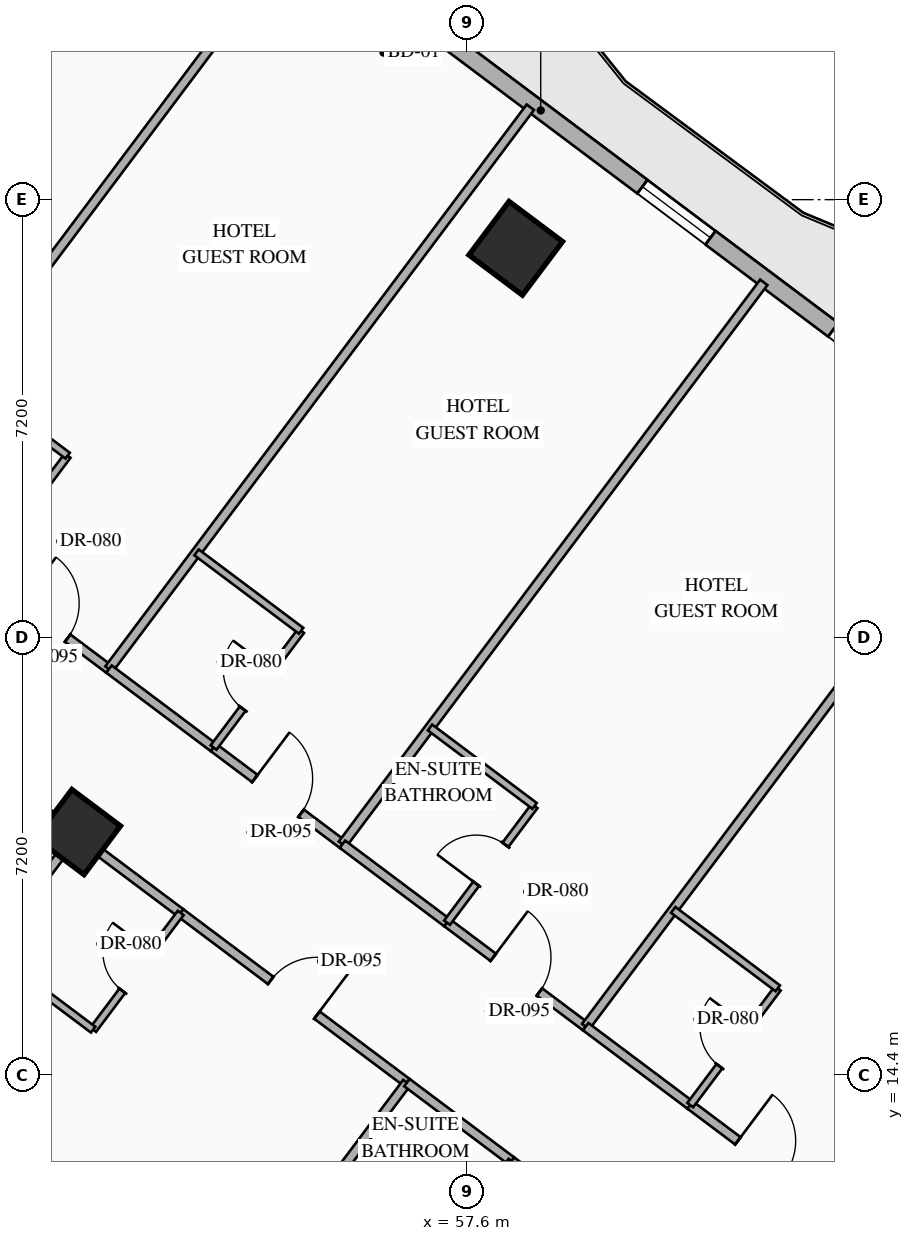
"""IFC4 building model, lengths in metres.
Left out: names, types, materials, properties, quantities, classifications, styles, units other than length and angle.
Written with IfcOpenShell. Run it as: python <this file> out.ifc"""

import sys

from ifc_helpers import new_model, si_unit, direction, frame, frame_2d, origin, origin_2d, place, context, subcontext, project, spatial, rectangle, hollow_rectangle, extrude, element, fill, save


model = new_model("IFC4")
c1 = context("Model", 3, precision=1e-05, world=origin(), true_north=direction((0.0, 1.0)))
c2 = subcontext(c1, "Body", "Model", "MODEL_VIEW")
j1 = project(units=[si_unit("LENGTHUNIT", "METRE"), si_unit("PLANEANGLEUNIT", "RADIAN")], contexts=[c1])
p1 = place(None, origin())
s1 = spatial("IfcSite", under=j1, at=p1, CompositionType="ELEMENT")
p2 = place(p1, origin())
s2 = spatial("IfcBuilding", under=s1, at=p2, CompositionType="ELEMENT")
p3 = place(p2, frame((0.0, 0.0, 63.4)))
s3 = spatial("IfcBuildingStorey", under=s2, at=p3, CompositionType="ELEMENT", Elevation=63.4)
p4 = place(p3, frame((58.4, 28.0, 0.0), z_axis=(0.0, 0.0, 1.0), x_axis=(0.799999996291, -0.600000004945, 0.0)))
e1 = element("IfcColumn", 1, at=p4, inside=s3, PredefinedType="COLUMN", context=c2, shape_type="SweptSolid", body=[
    extrude(hollow_rectangle(XDim=1.1, YDim=1.1, WallThickness=0.04, at=origin_2d()), origin(), (0.0, 0.0, 1.0), 3.35),
])
p5 = place(p3, frame((51.2, 18.4, 0.0), z_axis=(0.0, 0.0, 1.0), x_axis=(0.799999996291, -0.600000004945, 0.0)))
e2 = element("IfcColumn", 2, at=p5, inside=s3, PredefinedType="COLUMN", context=c2, shape_type="SweptSolid", body=[
    extrude(hollow_rectangle(XDim=1.0, YDim=1.0, WallThickness=0.038, at=origin_2d()), origin(), (0.0, 0.0, 1.0), 3.35),
])
p6 = place(p3, frame((44.86, 40.73, 0.0), z_axis=(0.0, 0.0, 1.0), x_axis=(0.800006902154, -0.599990797017, 0.0)))
e3 = element("IfcWall", 3, at=p6, inside=s3, PredefinedType="STANDARD", context=c2, shape_type="SweptSolid", body=[
    extrude(rectangle(XDim=29.712, YDim=0.28, at=frame_2d((14.856, 0.0))), origin(), (0.0, 0.0, 1.0), 3.13),
])
p7 = place(p6, frame((14.249, 0.0, 0.0)))
e4 = element("IfcOpeningElement", 4, at=p7, cuts=e3, PredefinedType="OPENING", context=c2, shape_type="SweptSolid", body=[
    extrude(rectangle(XDim=1.1, YDim=2.2, at=frame_2d((0.55, 1.1))), frame((0.0, 0.15, 0.0), z_axis=(0.0, -1.0, 0.0), x_axis=(1.0, 0.0, 0.0)), (0.0, 0.0, 1.0), 0.3),
])
p8 = place(p6, frame((1.612, 0.0, 0.85)))
e5 = element("IfcOpeningElement", 5, at=p8, cuts=e3, PredefinedType="OPENING", context=c2, shape_type="SweptSolid", body=[
    extrude(rectangle(XDim=1.4, YDim=1.8, at=frame_2d((0.7, 0.9))), frame((0.0, 0.15, 0.0), z_axis=(0.0, -1.0, 0.0), x_axis=(1.0, 0.0, 0.0)), (0.0, 0.0, 1.0), 0.3),
])
p9 = place(p6, frame((5.667, 0.0, 0.85)))
e6 = element("IfcOpeningElement", 6, at=p9, cuts=e3, PredefinedType="OPENING", context=c2, shape_type="SweptSolid", body=[
    extrude(rectangle(XDim=1.4, YDim=1.8, at=frame_2d((0.7, 0.9))), frame((0.0, 0.15, 0.0), z_axis=(0.0, -1.0, 0.0), x_axis=(1.0, 0.0, 0.0)), (0.0, 0.0, 1.0), 0.3),
])
p10 = place(p6, frame((9.912, 0.0, 0.85)))
e7 = element("IfcOpeningElement", 7, at=p10, cuts=e3, PredefinedType="OPENING", context=c2, shape_type="SweptSolid", body=[
    extrude(rectangle(XDim=1.4, YDim=1.8, at=frame_2d((0.7, 0.9))), frame((0.0, 0.15, 0.0), z_axis=(0.0, -1.0, 0.0), x_axis=(1.0, 0.0, 0.0)), (0.0, 0.0, 1.0), 0.3),
])
p11 = place(p6, frame((19.528, 0.0, 0.85)))
e8 = element("IfcOpeningElement", 8, at=p11, cuts=e3, PredefinedType="OPENING", context=c2, shape_type="SweptSolid", body=[
    extrude(rectangle(XDim=1.4, YDim=1.8, at=frame_2d((0.7, 0.9))), frame((0.0, 0.15, 0.0), z_axis=(0.0, -1.0, 0.0), x_axis=(1.0, 0.0, 0.0)), (0.0, 0.0, 1.0), 0.3),
])
p12 = place(p6, frame((23.451, 0.0, 0.85)))
e9 = element("IfcOpeningElement", 9, at=p12, cuts=e3, PredefinedType="OPENING", context=c2, shape_type="SweptSolid", body=[
    extrude(rectangle(XDim=1.4, YDim=1.8, at=frame_2d((0.7, 0.9))), frame((0.0, 0.15, 0.0), z_axis=(0.0, -1.0, 0.0), x_axis=(1.0, 0.0, 0.0)), (0.0, 0.0, 1.0), 0.3),
])
p13 = place(p6, frame((27.852, 0.0, 0.85)))
e10 = element("IfcOpeningElement", 10, at=p13, cuts=e3, PredefinedType="OPENING", context=c2, shape_type="SweptSolid", body=[
    extrude(rectangle(XDim=1.4, YDim=1.8, at=frame_2d((0.7, 0.9))), frame((0.0, 0.15, 0.0), z_axis=(0.0, -1.0, 0.0), x_axis=(1.0, 0.0, 0.0)), (0.0, 0.0, 1.0), 0.3),
])
p14 = place(p3, frame((49.59, 22.67, 0.0), z_axis=(0.0, 0.0, 1.0), x_axis=(0.800011056104, -0.599985258246, 0.0)))
e11 = element("IfcWall", 11, at=p14, inside=s3, PredefinedType="PARTITIONING", context=c2, shape_type="SweptSolid", body=[
    extrude(rectangle(XDim=2.65, YDim=0.15, at=frame_2d((1.325, 0.0))), origin(), (0.0, 0.0, 1.0), 2.775),
])
p15 = place(p14, frame((0.85, 0.0, 0.0)))
e12 = element("IfcOpeningElement", 12, at=p15, cuts=e11, PredefinedType="OPENING", context=c2, shape_type="SweptSolid", body=[
    extrude(rectangle(XDim=0.95, YDim=2.15, at=frame_2d((0.475, 1.075))), frame((0.0, 0.085, 0.0), z_axis=(0.0, -1.0, 0.0), x_axis=(1.0, 0.0, 0.0)), (0.0, 0.0, 1.0), 0.17),
])
p16 = place(p3, frame((49.59, 22.67, 0.0), z_axis=(0.0, 0.0, 1.0), x_axis=(0.599951172744, 0.800036618114, 0.0)))
e13 = element("IfcWall", 13, at=p16, inside=s3, PredefinedType="PARTITIONING", context=c2, shape_type="SweptSolid", body=[
    extrude(rectangle(XDim=2.4, YDim=0.12, at=frame_2d((1.2, 0.0))), origin(), (0.0, 0.0, 1.0), 3.13),
])
p17 = place(p16, frame((0.8, 0.0, 0.0)))
e14 = element("IfcOpeningElement", 14, at=p17, cuts=e13, PredefinedType="OPENING", context=c2, shape_type="SweptSolid", body=[
    extrude(rectangle(XDim=0.8, YDim=2.06, at=frame_2d((0.4, 1.03))), frame((0.0, 0.07, 0.0), z_axis=(0.0, -1.0, 0.0), x_axis=(1.0, 0.0, 0.0)), (0.0, 0.0, 1.0), 0.14),
])
p18 = place(p3, frame((49.31, 25.88, 0.0), z_axis=(0.0, 0.0, 1.0), x_axis=(0.800040880289, -0.59994548908, 0.0)))
e15 = element("IfcWall", 15, at=p18, inside=s3, PredefinedType="PARTITIONING", context=c2, shape_type="SweptSolid", body=[
    extrude(rectangle(XDim=2.15, YDim=0.12, at=frame_2d((1.075, 0.0))), origin(), (0.0, 0.0, 1.0), 3.13),
])
for number, where, z_axis, x_axis in (
    (16, (47.87, 23.96, 0.0), (0.0, 0.0, 1.0), (0.6, 0.8, 0.0)),
    (17, (51.71, 21.08, 0.0), (0.0, 0.0, 1.0), (0.6, 0.8, 0.0)),
):
    element("IfcWall", number, at=place(p3, frame(where, z_axis=z_axis, x_axis=x_axis)), inside=s3, PredefinedType="PARTITIONING", context=c2, shape_type="SweptSolid", body=[
        extrude(rectangle(XDim=11.55, YDim=0.15, at=frame_2d((5.775, 0.0))), origin(), (0.0, 0.0, 1.0), 3.13),
    ])
p19 = place(p3, frame((51.71, 21.08, 0.0), z_axis=(0.0, 0.0, 1.0), x_axis=(0.79998637334, -0.60001816845, 0.0)))
e18 = element("IfcWall", 18, at=p19, inside=s3, PredefinedType="PARTITIONING", context=c2, shape_type="SweptSolid", body=[
    extrude(rectangle(XDim=2.15, YDim=0.15, at=frame_2d((1.075, 0.0))), origin(), (0.0, 0.0, 1.0), 2.775),
])
p20 = place(p3, frame((53.43, 19.79, 0.0), z_axis=(0.0, 0.0, 1.0), x_axis=(0.8, -0.6, 0.0)))
e19 = element("IfcWall", 19, at=p20, inside=s3, PredefinedType="PARTITIONING", context=c2, shape_type="SweptSolid", body=[
    extrude(rectangle(XDim=2.65, YDim=0.15, at=frame_2d((1.325, 0.0))), origin(), (0.0, 0.0, 1.0), 2.775),
])
p21 = place(p20, frame((0.85, 0.0, 0.0)))
e20 = element("IfcOpeningElement", 20, at=p21, cuts=e19, PredefinedType="OPENING", context=c2, shape_type="SweptSolid", body=[
    extrude(rectangle(XDim=0.95, YDim=2.15, at=frame_2d((0.475, 1.075))), frame((0.0, 0.085, 0.0), z_axis=(0.0, -1.0, 0.0), x_axis=(1.0, 0.0, 0.0)), (0.0, 0.0, 1.0), 0.17),
])
p22 = place(p3, frame((53.43, 19.79, 0.0), z_axis=(0.0, 0.0, 1.0), x_axis=(0.600065100855, 0.79995117022, 0.0)))
e21 = element("IfcWall", 21, at=p22, inside=s3, PredefinedType="PARTITIONING", context=c2, shape_type="SweptSolid", body=[
    extrude(rectangle(XDim=2.4, YDim=0.12, at=frame_2d((1.2, 0.0))), origin(), (0.0, 0.0, 1.0), 3.13),
])
p23 = place(p22, frame((0.8, 0.0, 0.0)))
e22 = element("IfcOpeningElement", 22, at=p23, cuts=e21, PredefinedType="OPENING", context=c2, shape_type="SweptSolid", body=[
    extrude(rectangle(XDim=0.8, YDim=2.06, at=frame_2d((0.4, 1.03))), frame((0.0, 0.07, 0.0), z_axis=(0.0, -1.0, 0.0), x_axis=(1.0, 0.0, 0.0)), (0.0, 0.0, 1.0), 0.14),
])
p24 = place(p3, frame((53.15, 23.0, 0.0), z_axis=(0.0, 0.0, 1.0), x_axis=(0.800027249606, -0.599963665473, 0.0)))
e23 = element("IfcWall", 23, at=p24, inside=s3, PredefinedType="PARTITIONING", context=c2, shape_type="SweptSolid", body=[
    extrude(rectangle(XDim=2.15, YDim=0.12, at=frame_2d((1.075, 0.0))), origin(), (0.0, 0.0, 1.0), 3.13),
])
p25 = place(p3, frame((55.55, 18.2, 0.0), z_axis=(0.0, 0.0, 1.0), x_axis=(0.599996617946, 0.80000253653, 0.0)))
e24 = element("IfcWall", 24, at=p25, inside=s3, PredefinedType="PARTITIONING", context=c2, shape_type="SweptSolid", body=[
    extrude(rectangle(XDim=11.55, YDim=0.15, at=frame_2d((5.775, 0.0))), origin(), (0.0, 0.0, 1.0), 3.13),
])
p26 = place(p3, frame((55.55, 18.2, 0.0), z_axis=(0.0, 0.0, 1.0), x_axis=(0.79998637334, -0.60001816845, 0.0)))
e25 = element("IfcWall", 25, at=p26, inside=s3, PredefinedType="PARTITIONING", context=c2, shape_type="SweptSolid", body=[
    extrude(rectangle(XDim=2.15, YDim=0.15, at=frame_2d((1.075, 0.0))), origin(), (0.0, 0.0, 1.0), 2.775),
])
p27 = place(p3, frame((57.27, 16.91, 0.0), z_axis=(0.0, 0.0, 1.0), x_axis=(0.800010279488, -0.599986293772, 0.0)))
e26 = element("IfcWall", 26, at=p27, inside=s3, PredefinedType="PARTITIONING", context=c2, shape_type="SweptSolid", body=[
    extrude(rectangle(XDim=2.85, YDim=0.15, at=frame_2d((1.425, 0.0))), origin(), (0.0, 0.0, 1.0), 2.775),
])
p28 = place(p27, frame((0.95, 0.0, 0.0)))
e27 = element("IfcOpeningElement", 27, at=p28, cuts=e26, PredefinedType="OPENING", context=c2, shape_type="SweptSolid", body=[
    extrude(rectangle(XDim=0.95, YDim=2.15, at=frame_2d((0.475, 1.075))), frame((0.0, 0.085, 0.0), z_axis=(0.0, -1.0, 0.0), x_axis=(1.0, 0.0, 0.0)), (0.0, 0.0, 1.0), 0.17),
])
p29 = place(p3, frame((57.27, 16.91, 0.0), z_axis=(0.0, 0.0, 1.0), x_axis=(0.599951172744, 0.800036618114, 0.0)))
e28 = element("IfcWall", 28, at=p29, inside=s3, PredefinedType="PARTITIONING", context=c2, shape_type="SweptSolid", body=[
    extrude(rectangle(XDim=2.4, YDim=0.12, at=frame_2d((1.2, 0.0))), origin(), (0.0, 0.0, 1.0), 3.13),
])
p30 = place(p29, frame((0.8, 0.0, 0.0)))
e29 = element("IfcOpeningElement", 29, at=p30, cuts=e28, PredefinedType="OPENING", context=c2, shape_type="SweptSolid", body=[
    extrude(rectangle(XDim=0.8, YDim=2.06, at=frame_2d((0.4, 1.03))), frame((0.0, 0.07, 0.0), z_axis=(0.0, -1.0, 0.0), x_axis=(1.0, 0.0, 0.0)), (0.0, 0.0, 1.0), 0.14),
])
p31 = place(p3, frame((56.99, 20.12, 0.0), z_axis=(0.0, 0.0, 1.0), x_axis=(0.79998637334, -0.60001816845, 0.0)))
e30 = element("IfcWall", 30, at=p31, inside=s3, PredefinedType="PARTITIONING", context=c2, shape_type="SweptSolid", body=[
    extrude(rectangle(XDim=2.15, YDim=0.12, at=frame_2d((1.075, 0.0))), origin(), (0.0, 0.0, 1.0), 3.13),
])
p32 = place(p3, frame((59.55, 15.2, 0.0), z_axis=(0.0, 0.0, 1.0), x_axis=(0.599996617946, 0.80000253653, 0.0)))
e31 = element("IfcWall", 31, at=p32, inside=s3, PredefinedType="PARTITIONING", context=c2, shape_type="SweptSolid", body=[
    extrude(rectangle(XDim=11.55, YDim=0.15, at=frame_2d((5.775, 0.0))), origin(), (0.0, 0.0, 1.0), 3.13),
])
p33 = place(p3, frame((59.55, 15.2, 0.0), z_axis=(0.0, 0.0, 1.0), x_axis=(0.79998637334, -0.60001816845, 0.0)))
e32 = element("IfcWall", 32, at=p33, inside=s3, PredefinedType="PARTITIONING", context=c2, shape_type="SweptSolid", body=[
    extrude(rectangle(XDim=2.15, YDim=0.15, at=frame_2d((1.075, 0.0))), origin(), (0.0, 0.0, 1.0), 2.775),
])
p34 = place(p3, frame((61.27, 13.91, 0.0), z_axis=(0.0, 0.0, 1.0), x_axis=(0.800010068184, -0.59998657552, 0.0)))
e33 = element("IfcWall", 33, at=p34, inside=s3, PredefinedType="PARTITIONING", context=c2, shape_type="SweptSolid", body=[
    extrude(rectangle(XDim=2.91, YDim=0.15, at=frame_2d((1.455, 0.0))), origin(), (0.0, 0.0, 1.0), 3.13),
])
p35 = place(p34, frame((0.98, 0.0, 0.0)))
e34 = element("IfcOpeningElement", 34, at=p35, cuts=e33, PredefinedType="OPENING", context=c2, shape_type="SweptSolid", body=[
    extrude(rectangle(XDim=0.95, YDim=2.15, at=frame_2d((0.475, 1.075))), frame((0.0, 0.085, 0.0), z_axis=(0.0, -1.0, 0.0), x_axis=(1.0, 0.0, 0.0)), (0.0, 0.0, 1.0), 0.17),
])
p36 = place(p3, frame((61.27, 13.91, 0.0), z_axis=(0.0, 0.0, 1.0), x_axis=(0.599951172744, 0.800036618114, 0.0)))
e35 = element("IfcWall", 35, at=p36, inside=s3, PredefinedType="PARTITIONING", context=c2, shape_type="SweptSolid", body=[
    extrude(rectangle(XDim=2.4, YDim=0.12, at=frame_2d((1.2, 0.0))), origin(), (0.0, 0.0, 1.0), 3.13),
])
p37 = place(p36, frame((0.8, 0.0, 0.0)))
e36 = element("IfcOpeningElement", 36, at=p37, cuts=e35, PredefinedType="OPENING", context=c2, shape_type="SweptSolid", body=[
    extrude(rectangle(XDim=0.8, YDim=2.06, at=frame_2d((0.4, 1.03))), frame((0.0, 0.07, 0.0), z_axis=(0.0, -1.0, 0.0), x_axis=(1.0, 0.0, 0.0)), (0.0, 0.0, 1.0), 0.14),
])
p38 = place(p3, frame((60.99, 17.12, 0.0), z_axis=(0.0, 0.0, 1.0), x_axis=(0.79998637334, -0.60001816845, 0.0)))
e37 = element("IfcWall", 37, at=p38, inside=s3, PredefinedType="PARTITIONING", context=c2, shape_type="SweptSolid", body=[
    extrude(rectangle(XDim=2.15, YDim=0.12, at=frame_2d((1.075, 0.0))), origin(), (0.0, 0.0, 1.0), 3.13),
])
p39 = place(p3, frame((49.45, 19.65, 0.0), z_axis=(0.0, 0.0, 1.0), x_axis=(0.800040880289, -0.59994548908, 0.0)))
e38 = element("IfcWall", 38, at=p39, inside=s3, PredefinedType="PARTITIONING", context=c2, shape_type="SweptSolid", body=[
    extrude(rectangle(XDim=2.15, YDim=0.15, at=frame_2d((1.075, 0.0))), origin(), (0.0, 0.0, 1.0), 2.425),
])
p40 = place(p3, frame((44.36, 9.28, 0.0), z_axis=(0.0, 0.0, 1.0), x_axis=(0.599986233332, 0.800010324816, 0.0)))
e39 = element("IfcWall", 39, at=p40, inside=s3, PredefinedType="PARTITIONING", context=c2, shape_type="SweptSolid", body=[
    extrude(rectangle(XDim=11.35, YDim=0.15, at=frame_2d((5.675, 0.0))), origin(), (0.0, 0.0, 1.0), 2.425),
])
p41 = place(p3, frame((51.17, 18.36, 0.0), z_axis=(0.0, 0.0, 1.0), x_axis=(0.79998637334, -0.60001816845, 0.0)))
e40 = element("IfcWall", 40, at=p41, inside=s3, PredefinedType="PARTITIONING", context=c2, shape_type="SweptSolid", body=[
    extrude(rectangle(XDim=2.15, YDim=0.15, at=frame_2d((1.075, 0.0))), origin(), (0.0, 0.0, 1.0), 2.425),
])
p42 = place(p3, frame((52.89, 17.07, 0.0), z_axis=(0.0, 0.0, 1.0), x_axis=(0.800012600101, -0.599983199498, 0.0)))
e41 = element("IfcWall", 41, at=p42, inside=s3, PredefinedType="PARTITIONING", context=c2, shape_type="SweptSolid", body=[
    extrude(rectangle(XDim=4.65, YDim=0.15, at=frame_2d((2.325, 0.0))), origin(), (0.0, 0.0, 1.0), 2.425),
])
p43 = place(p42, frame((1.85, 0.0, 0.0)))
e42 = element("IfcOpeningElement", 42, at=p43, cuts=e41, PredefinedType="OPENING", context=c2, shape_type="SweptSolid", body=[
    extrude(rectangle(XDim=0.95, YDim=2.15, at=frame_2d((0.475, 1.075))), frame((0.0, 0.085, 0.0), z_axis=(0.0, -1.0, 0.0), x_axis=(1.0, 0.0, 0.0)), (0.0, 0.0, 1.0), 0.17),
])
p44 = place(p3, frame((51.45, 15.15, 0.0), z_axis=(0.0, 0.0, 1.0), x_axis=(0.599951172744, 0.800036618114, 0.0)))
e43 = element("IfcWall", 43, at=p44, inside=s3, PredefinedType="PARTITIONING", context=c2, shape_type="SweptSolid", body=[
    extrude(rectangle(XDim=2.4, YDim=0.12, at=frame_2d((1.2, 0.0))), origin(), (0.0, 0.0, 1.0), 3.13),
])
p45 = place(p44, frame((0.8, 0.0, 0.0)))
e44 = element("IfcOpeningElement", 44, at=p45, cuts=e43, PredefinedType="OPENING", context=c2, shape_type="SweptSolid", body=[
    extrude(rectangle(XDim=0.8, YDim=2.06, at=frame_2d((0.4, 1.03))), frame((0.0, 0.07, 0.0), z_axis=(0.0, -1.0, 0.0), x_axis=(1.0, 0.0, 0.0)), (0.0, 0.0, 1.0), 0.14),
])
p46 = place(p3, frame((49.73, 16.44, 0.0), z_axis=(0.0, 0.0, 1.0), x_axis=(0.79998637334, -0.60001816845, 0.0)))
e45 = element("IfcWall", 45, at=p46, inside=s3, PredefinedType="PARTITIONING", context=c2, shape_type="SweptSolid", body=[
    extrude(rectangle(XDim=2.15, YDim=0.12, at=frame_2d((1.075, 0.0))), origin(), (0.0, 0.0, 1.0), 3.13),
])
p47 = place(p3, frame((49.8, 5.2, 0.0), z_axis=(0.0, 0.0, 1.0), x_axis=(0.6, 0.8, 0.0)))
e46 = element("IfcWall", 46, at=p47, inside=s3, PredefinedType="PARTITIONING", context=c2, shape_type="SweptSolid", body=[
    extrude(rectangle(XDim=11.35, YDim=0.15, at=frame_2d((5.675, 0.0))), origin(), (0.0, 0.0, 1.0), 3.13),
])
p48 = place(p3, frame((56.61, 14.28, 0.0), z_axis=(0.0, 0.0, 1.0), x_axis=(0.79998637334, -0.60001816845, 0.0)))
e47 = element("IfcWall", 47, at=p48, inside=s3, PredefinedType="PARTITIONING", context=c2, shape_type="SweptSolid", body=[
    extrude(rectangle(XDim=2.15, YDim=0.15, at=frame_2d((1.075, 0.0))), origin(), (0.0, 0.0, 1.0), 2.425),
])
p49 = place(p3, frame((58.33, 12.99, 0.0), z_axis=(0.0, 0.0, 1.0), x_axis=(0.799993779569, -0.600008293819, 0.0)))
e48 = element("IfcWall", 48, at=p49, inside=s3, PredefinedType="PARTITIONING", context=c2, shape_type="SweptSolid", body=[
    extrude(rectangle(XDim=4.71, YDim=0.15, at=frame_2d((2.355, 0.0))), origin(), (0.0, 0.0, 1.0), 2.425),
])
p50 = place(p49, frame((3.23, 0.0, 0.0)))
e49 = element("IfcOpeningElement", 49, at=p50, cuts=e48, PredefinedType="OPENING", context=c2, shape_type="SweptSolid", body=[
    extrude(rectangle(XDim=0.95, YDim=2.15, at=frame_2d((0.475, 1.075))), frame((0.0, 0.085, 0.0), z_axis=(0.0, -1.0, 0.0), x_axis=(1.0, 0.0, 0.0)), (0.0, 0.0, 1.0), 0.17),
])
p51 = place(p3, frame((56.89, 11.07, 0.0), z_axis=(0.0, 0.0, 1.0), x_axis=(0.600065100855, 0.79995117022, 0.0)))
e50 = element("IfcWall", 50, at=p51, inside=s3, PredefinedType="PARTITIONING", context=c2, shape_type="SweptSolid", body=[
    extrude(rectangle(XDim=2.4, YDim=0.12, at=frame_2d((1.2, 0.0))), origin(), (0.0, 0.0, 1.0), 3.13),
])
p52 = place(p51, frame((0.8, 0.0, 0.0)))
e51 = element("IfcOpeningElement", 51, at=p52, cuts=e50, PredefinedType="OPENING", context=c2, shape_type="SweptSolid", body=[
    extrude(rectangle(XDim=0.8, YDim=2.06, at=frame_2d((0.4, 1.03))), frame((0.0, 0.07, 0.0), z_axis=(0.0, -1.0, 0.0), x_axis=(1.0, 0.0, 0.0)), (0.0, 0.0, 1.0), 0.14),
])
p53 = place(p11, origin())
e52 = element("IfcWindow", 52, at=p53, inside=s3, PartitioningType="SINGLE_PANEL", PredefinedType="WINDOW", context=c2, shape_type="SweptSolid", body=[
    extrude(rectangle(XDim=1.4, YDim=1.8, at=frame_2d((0.7, 0.9))), frame((0.0, 0.03, 0.0), z_axis=(0.0, -1.0, 0.0), x_axis=(1.0, 0.0, 0.0)), (0.0, 0.0, 1.0), 0.06),
])
fill(e8, e52)
p54 = place(p12, origin())
e53 = element("IfcWindow", 53, at=p54, inside=s3, PartitioningType="SINGLE_PANEL", PredefinedType="WINDOW", context=c2, shape_type="SweptSolid", body=[
    extrude(rectangle(XDim=1.4, YDim=1.8, at=frame_2d((0.7, 0.9))), frame((0.0, 0.03, 0.0), z_axis=(0.0, -1.0, 0.0), x_axis=(1.0, 0.0, 0.0)), (0.0, 0.0, 1.0), 0.06),
])
fill(e9, e53)
p55 = place(p15, origin())
e54 = element("IfcDoor", 54, at=p55, inside=s3, OperationType="SINGLE_SWING_LEFT", PredefinedType="DOOR", context=c2, shape_type="SweptSolid", body=[
    extrude(rectangle(XDim=0.95, YDim=2.15, at=frame_2d((0.475, 1.075))), frame((0.0, 0.025, 0.0), z_axis=(0.0, -1.0, 0.0), x_axis=(1.0, 0.0, 0.0)), (0.0, 0.0, 1.0), 0.05),
])
fill(e12, e54)
p56 = place(p21, origin())
e55 = element("IfcDoor", 55, at=p56, inside=s3, OperationType="SINGLE_SWING_LEFT", PredefinedType="DOOR", context=c2, shape_type="SweptSolid", body=[
    extrude(rectangle(XDim=0.95, YDim=2.15, at=frame_2d((0.475, 1.075))), frame((0.0, 0.025, 0.0), z_axis=(0.0, -1.0, 0.0), x_axis=(1.0, 0.0, 0.0)), (0.0, 0.0, 1.0), 0.05),
])
fill(e20, e55)
p57 = place(p23, origin())
e56 = element("IfcDoor", 56, at=p57, inside=s3, OperationType="SINGLE_SWING_RIGHT", PredefinedType="DOOR", context=c2, shape_type="SweptSolid", body=[
    extrude(rectangle(XDim=0.8, YDim=2.06, at=frame_2d((0.4, 1.03))), frame((0.0, 0.025, 0.0), z_axis=(0.0, -1.0, 0.0), x_axis=(1.0, 0.0, 0.0)), (0.0, 0.0, 1.0), 0.05),
])
fill(e22, e56)
p58 = place(p28, origin())
e57 = element("IfcDoor", 57, at=p58, inside=s3, OperationType="SINGLE_SWING_LEFT", PredefinedType="DOOR", context=c2, shape_type="SweptSolid", body=[
    extrude(rectangle(XDim=0.95, YDim=2.15, at=frame_2d((0.475, 1.075))), frame((0.0, 0.025, 0.0), z_axis=(0.0, -1.0, 0.0), x_axis=(1.0, 0.0, 0.0)), (0.0, 0.0, 1.0), 0.05),
])
fill(e27, e57)
p59 = place(p30, origin())
e58 = element("IfcDoor", 58, at=p59, inside=s3, OperationType="SINGLE_SWING_LEFT", PredefinedType="DOOR", context=c2, shape_type="SweptSolid", body=[
    extrude(rectangle(XDim=0.8, YDim=2.06, at=frame_2d((0.4, 1.03))), frame((0.0, 0.025, 0.0), z_axis=(0.0, -1.0, 0.0), x_axis=(1.0, 0.0, 0.0)), (0.0, 0.0, 1.0), 0.05),
])
fill(e29, e58)
p60 = place(p35, origin())
e59 = element("IfcDoor", 59, at=p60, inside=s3, OperationType="SINGLE_SWING_LEFT", PredefinedType="DOOR", context=c2, shape_type="SweptSolid", body=[
    extrude(rectangle(XDim=0.95, YDim=2.15, at=frame_2d((0.475, 1.075))), frame((0.0, 0.025, 0.0), z_axis=(0.0, -1.0, 0.0), x_axis=(1.0, 0.0, 0.0)), (0.0, 0.0, 1.0), 0.05),
])
fill(e34, e59)
p61 = place(p37, origin())
e60 = element("IfcDoor", 60, at=p61, inside=s3, OperationType="SINGLE_SWING_RIGHT", PredefinedType="DOOR", context=c2, shape_type="SweptSolid", body=[
    extrude(rectangle(XDim=0.8, YDim=2.06, at=frame_2d((0.4, 1.03))), frame((0.0, 0.025, 0.0), z_axis=(0.0, -1.0, 0.0), x_axis=(1.0, 0.0, 0.0)), (0.0, 0.0, 1.0), 0.05),
])
fill(e36, e60)
p62 = place(p43, origin())
e61 = element("IfcDoor", 61, at=p62, inside=s3, OperationType="SINGLE_SWING_RIGHT", PredefinedType="DOOR", context=c2, shape_type="SweptSolid", body=[
    extrude(rectangle(XDim=0.95, YDim=2.15, at=frame_2d((0.475, 1.075))), frame((0.0, 0.025, 0.0), z_axis=(0.0, -1.0, 0.0), x_axis=(1.0, 0.0, 0.0)), (0.0, 0.0, 1.0), 0.05),
])
fill(e42, e61)
p63 = place(p45, origin())
e62 = element("IfcDoor", 62, at=p63, inside=s3, OperationType="SINGLE_SWING_RIGHT", PredefinedType="DOOR", context=c2, shape_type="SweptSolid", body=[
    extrude(rectangle(XDim=0.8, YDim=2.06, at=frame_2d((0.4, 1.03))), frame((0.0, 0.025, 0.0), z_axis=(0.0, -1.0, 0.0), x_axis=(1.0, 0.0, 0.0)), (0.0, 0.0, 1.0), 0.05),
])
fill(e44, e62)
save(model, sys.argv[1])
